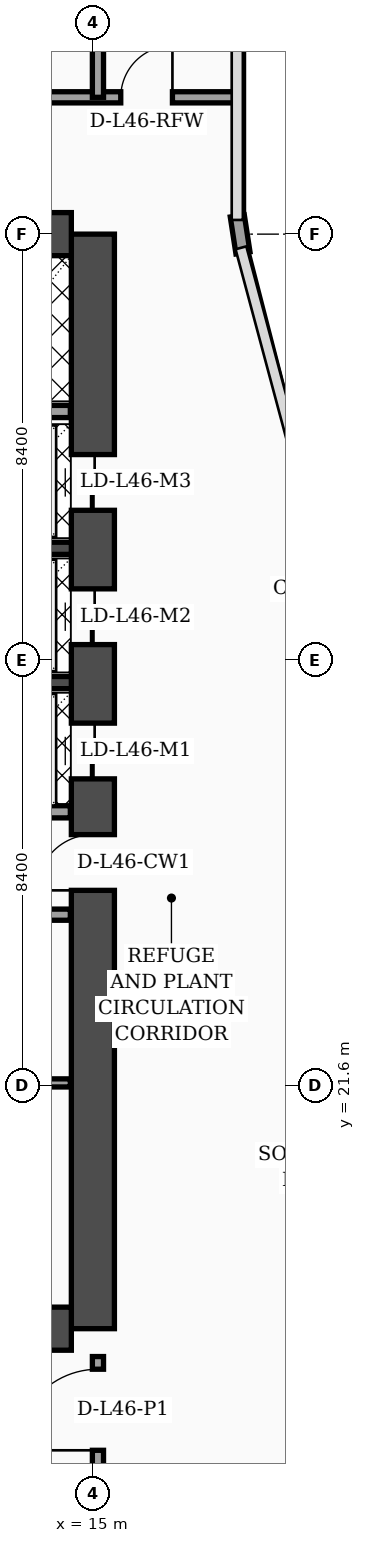
"""IFC4 building model, lengths in metres.
Left out: names, types, materials, properties, quantities, classifications, styles, units other than length and angle.
Written with IfcOpenShell. Run it as: python <this file> out.ifc"""

import sys

from ifc_helpers import new_model, si_unit, direction, frame, frame_2d, origin, place, context, subcontext, project, spatial, rectangle, extrude, element, fill, save


model = new_model("IFC4")
c1 = context("Model", 3, precision=1e-05, world=origin(), true_north=direction((0.0, 1.0)))
c2 = subcontext(c1, "Body", "Model", "MODEL_VIEW")
j1 = project(units=[si_unit("LENGTHUNIT", "METRE"), si_unit("PLANEANGLEUNIT", "RADIAN")], contexts=[c1])
p1 = place(None, origin())
s1 = spatial("IfcSite", under=j1, at=p1, CompositionType="ELEMENT")
p2 = place(p1, origin())
s2 = spatial("IfcBuilding", under=s1, at=p2, CompositionType="ELEMENT")
p3 = place(p2, frame((0.0, 0.0, 186.5)))
s3 = spatial("IfcBuildingStorey", under=s2, at=p3, CompositionType="ELEMENT", Elevation=186.5)
p4 = place(p3, frame((15.0, 16.8, 0.0), z_axis=(0.0, 0.0, 1.0), x_axis=(0.0, 1.0, 0.0)))
e1 = element("IfcWall", 1, at=p4, inside=s3, PredefinedType="SHEAR", context=c2, shape_type="SweptSolid", body=[
    extrude(rectangle(XDim=21.6, YDim=0.85, at=frame_2d((10.8, 0.0))), origin(), (0.0, 0.0, 1.0), 4.35),
])
p5 = place(p4, frame((8.65, 0.0, 0.0)))
e2 = element("IfcOpeningElement", 2, at=p5, cuts=e1, PredefinedType="OPENING", context=c2, shape_type="SweptSolid", body=[
    extrude(rectangle(XDim=1.1, YDim=2.2, at=frame_2d((0.55, 1.1))), frame((0.0, 0.435, 0.0), z_axis=(0.0, -1.0, 0.0), x_axis=(1.0, 0.0, 0.0)), (0.0, 0.0, 1.0), 0.87),
])
p6 = place(p4, frame((10.85, 0.0, 0.0)))
e3 = element("IfcOpeningElement", 3, at=p6, cuts=e1, PredefinedType="OPENING", context=c2, shape_type="SweptSolid", body=[
    extrude(rectangle(XDim=1.1, YDim=2.2, at=frame_2d((0.55, 1.1))), frame((0.0, 0.435, 0.0), z_axis=(0.0, -1.0, 0.0), x_axis=(1.0, 0.0, 0.0)), (0.0, 0.0, 1.0), 0.87),
])
p7 = place(p4, frame((13.5, 0.0, 0.0)))
e4 = element("IfcOpeningElement", 4, at=p7, cuts=e1, PredefinedType="OPENING", context=c2, shape_type="SweptSolid", body=[
    extrude(rectangle(XDim=1.1, YDim=2.2, at=frame_2d((0.55, 1.1))), frame((0.0, 0.435, 0.0), z_axis=(0.0, -1.0, 0.0), x_axis=(1.0, 0.0, 0.0)), (0.0, 0.0, 1.0), 0.87),
])
p8 = place(p4, frame((16.15, 0.0, 0.0)))
e5 = element("IfcOpeningElement", 5, at=p8, cuts=e1, PredefinedType="OPENING", context=c2, shape_type="SweptSolid", body=[
    extrude(rectangle(XDim=1.1, YDim=2.2, at=frame_2d((0.55, 1.1))), frame((0.0, 0.435, 0.0), z_axis=(0.0, -1.0, 0.0), x_axis=(1.0, 0.0, 0.0)), (0.0, 0.0, 1.0), 0.87),
])
for number, where, z_axis, x_axis in (
    (6, (4.625, 38.4, 0.0), (0.0, 0.0, 1.0), (1.0, 0.0, 0.0)),
    (7, (4.625, 16.8, 0.0), (0.0, 0.0, 1.0), (1.0, 0.0, 0.0)),
):
    element("IfcWall", number, at=place(p3, frame(where, z_axis=z_axis, x_axis=x_axis)), inside=s3, PredefinedType="SHEAR", context=c2, shape_type="SweptSolid", body=[
        extrude(rectangle(XDim=9.95, YDim=0.85, at=frame_2d((4.975, 0.0))), origin(), (0.0, 0.0, 1.0), 4.35),
    ])
for number, where, z_axis, x_axis in (
    (8, (12.18, 29.55, 0.0), (0.0, 0.0, 1.0), (1.0, 0.0, 0.0)),
    (9, (12.18, 32.2, 0.0), (0.0, 0.0, 1.0), (1.0, 0.0, 0.0)),
):
    element("IfcWall", number, at=place(p3, frame(where, z_axis=z_axis, x_axis=x_axis)), inside=s3, PredefinedType="SOLIDWALL", context=c2, shape_type="SweptSolid", body=[
        extrude(rectangle(XDim=2.395, YDim=0.24, at=frame_2d((1.198, 0.0))), origin(), (0.0, 0.0, 1.0), 4.35),
    ])
p9 = place(p3, frame((17.962, 38.03, 0.0), z_axis=(0.0, 0.0, 1.0), x_axis=(-0.15141125477, 0.988470855377, 0.0)))
e10 = element("IfcWall", 10, at=p9, inside=s3, PredefinedType="SOLIDWALL", context=c2, shape_type="SweptSolid", body=[
    extrude(rectangle(XDim=0.739, YDim=0.28, at=frame_2d((0.369, 0.0))), origin(), (0.0, 0.0, 1.0), 4.35),
])
p10 = place(p3, frame((9.68, 21.65, 0.0), z_axis=(0.0, 0.0, 1.0), x_axis=(1.0, 0.0, 0.0)))
e11 = element("IfcWall", 11, at=p10, inside=s3, PredefinedType="PARTITIONING", context=c2, shape_type="SweptSolid", body=[
    extrude(rectangle(XDim=4.875, YDim=0.16, at=frame_2d((2.438, 0.0))), origin(), (0.0, 0.0, 1.0), 4.35),
])
p11 = place(p10, frame((1.1, 0.0, 0.0)))
e12 = element("IfcOpeningElement", 12, at=p11, cuts=e11, PredefinedType="OPENING", context=c2, shape_type="SweptSolid", body=[
    extrude(rectangle(XDim=0.98, YDim=2.15, at=frame_2d((0.49, 1.075))), frame((0.0, 0.09, 0.0), z_axis=(0.0, -1.0, 0.0), x_axis=(1.0, 0.0, 0.0)), (0.0, 0.0, 1.0), 0.18),
])
p12 = place(p3, frame((9.68, 24.97, 0.0), z_axis=(0.0, 0.0, 1.0), x_axis=(1.0, 0.0, 0.0)))
e13 = element("IfcWall", 13, at=p12, inside=s3, PredefinedType="SOLIDWALL", context=c2, shape_type="SweptSolid", body=[
    extrude(rectangle(XDim=4.875, YDim=0.22, at=frame_2d((2.438, 0.0))), origin(), (0.0, 0.0, 1.0), 3.75),
])
p13 = place(p12, frame((0.9, 0.0, 0.0)))
e14 = element("IfcOpeningElement", 14, at=p13, cuts=e13, PredefinedType="OPENING", context=c2, shape_type="SweptSolid", body=[
    extrude(rectangle(XDim=0.98, YDim=2.15, at=frame_2d((0.49, 1.075))), frame((0.0, 0.12, 0.0), z_axis=(0.0, -1.0, 0.0), x_axis=(1.0, 0.0, 0.0)), (0.0, 0.0, 1.0), 0.24),
])
p14 = place(p3, frame((12.25, 27.0, 0.0), z_axis=(0.0, 0.0, 1.0), x_axis=(1.0, 0.0, 0.0)))
e15 = element("IfcWall", 15, at=p14, inside=s3, PredefinedType="SOLIDWALL", context=c2, shape_type="SweptSolid", body=[
    extrude(rectangle(XDim=2.305, YDim=0.24, at=frame_2d((1.152, 0.0))), origin(), (0.0, 0.0, 1.0), 4.35),
])
p15 = place(p3, frame((9.66, 34.9, 0.0), z_axis=(0.0, 0.0, 1.0), x_axis=(1.0, 0.0, 0.0)))
e16 = element("IfcWall", 16, at=p15, inside=s3, PredefinedType="SOLIDWALL", context=c2, shape_type="SweptSolid", body=[
    extrude(rectangle(XDim=4.895, YDim=0.24, at=frame_2d((2.448, 0.0))), origin(), (0.0, 0.0, 1.0), 4.35),
])
p16 = place(p3, frame((4.2, 41.1, 0.0), z_axis=(0.0, 0.0, 1.0), x_axis=(1.0, 0.0, 0.0)))
e17 = element("IfcWall", 17, at=p16, inside=s3, PredefinedType="SOLIDWALL", context=c2, shape_type="SweptSolid", body=[
    extrude(rectangle(XDim=13.65, YDim=0.22, at=frame_2d((6.825, 0.0))), origin(), (0.0, 0.0, 1.0), 3.75),
])
p17 = place(p16, frame((1.8, 0.0, 0.0)))
e18 = element("IfcOpeningElement", 18, at=p17, cuts=e17, PredefinedType="OPENING", context=c2, shape_type="SweptSolid", body=[
    extrude(rectangle(XDim=0.98, YDim=2.15, at=frame_2d((0.49, 1.075))), frame((0.0, 0.12, 0.0), z_axis=(0.0, -1.0, 0.0), x_axis=(1.0, 0.0, 0.0)), (0.0, 0.0, 1.0), 0.24),
])
p18 = place(p16, frame((6.8, 0.0, 0.0)))
e19 = element("IfcOpeningElement", 19, at=p18, cuts=e17, PredefinedType="OPENING", context=c2, shape_type="SweptSolid", body=[
    extrude(rectangle(XDim=1.15, YDim=2.2, at=frame_2d((0.575, 1.1))), frame((0.0, 0.12, 0.0), z_axis=(0.0, -1.0, 0.0), x_axis=(1.0, 0.0, 0.0)), (0.0, 0.0, 1.0), 0.24),
])
p19 = place(p16, frame((11.35, 0.0, 0.0)))
e20 = element("IfcOpeningElement", 20, at=p19, cuts=e17, PredefinedType="OPENING", context=c2, shape_type="SweptSolid", body=[
    extrude(rectangle(XDim=1.02, YDim=2.2, at=frame_2d((0.51, 1.1))), frame((0.0, 0.12, 0.0), z_axis=(0.0, -1.0, 0.0), x_axis=(1.0, 0.0, 0.0)), (0.0, 0.0, 1.0), 0.24),
])
p20 = place(p3, frame((15.1, 41.1, 0.0), z_axis=(0.0, 0.0, 1.0), x_axis=(0.0, 1.0, 0.0)))
e21 = element("IfcWall", 21, at=p20, inside=s3, PredefinedType="SOLIDWALL", context=c2, shape_type="SweptSolid", body=[
    extrude(rectangle(XDim=6.7, YDim=0.22, at=frame_2d((3.35, 0.0))), origin(), (0.0, 0.0, 1.0), 3.75),
])
p21 = place(p3, frame((15.1, 4.2, 0.0), z_axis=(0.0, 0.0, 1.0), x_axis=(0.0, 1.0, 0.0)))
e22 = element("IfcWall", 22, at=p21, inside=s3, PredefinedType="SOLIDWALL", context=c2, shape_type="SweptSolid", body=[
    extrude(rectangle(XDim=12.05, YDim=0.22, at=frame_2d((6.025, 0.0))), origin(), (0.0, 0.0, 1.0), 3.3),
])
p22 = place(p21, frame((10.2, 0.0, 0.0)))
e23 = element("IfcOpeningElement", 23, at=p22, cuts=e22, PredefinedType="OPENING", context=c2, shape_type="SweptSolid", body=[
    extrude(rectangle(XDim=1.6, YDim=2.35, at=frame_2d((0.8, 1.175))), frame((0.0, 0.12, 0.0), z_axis=(0.0, -1.0, 0.0), x_axis=(1.0, 0.0, 0.0)), (0.0, 0.0, 1.0), 0.24),
])
p23 = place(p19, origin())
e24 = element("IfcDoor", 24, at=p23, inside=s3, OperationType="SINGLE_SWING_RIGHT", PredefinedType="DOOR", context=c2, shape_type="SweptSolid", body=[
    extrude(rectangle(XDim=1.02, YDim=2.2, at=frame_2d((0.51, 1.1))), frame((0.0, 0.025, 0.0), z_axis=(0.0, -1.0, 0.0), x_axis=(1.0, 0.0, 0.0)), (0.0, 0.0, 1.0), 0.05),
])
fill(e20, e24)
p24 = place(p22, origin())
e25 = element("IfcDoor", 25, at=p24, inside=s3, OperationType="SINGLE_SWING_LEFT", PredefinedType="DOOR", context=c2, shape_type="SweptSolid", body=[
    extrude(rectangle(XDim=1.6, YDim=2.35, at=frame_2d((0.8, 1.175))), frame((0.0, 0.025, 0.0), z_axis=(0.0, -1.0, 0.0), x_axis=(1.0, 0.0, 0.0)), (0.0, 0.0, 1.0), 0.05),
])
fill(e23, e25)
p25 = place(p5, origin())
e26 = element("IfcDoor", 26, at=p25, inside=s3, OperationType="SINGLE_SWING_LEFT", PredefinedType="DOOR", context=c2, shape_type="SweptSolid", body=[
    extrude(rectangle(XDim=1.1, YDim=2.2, at=frame_2d((0.55, 1.1))), frame((0.0, 0.025, 0.0), z_axis=(0.0, -1.0, 0.0), x_axis=(1.0, 0.0, 0.0)), (0.0, 0.0, 1.0), 0.05),
])
fill(e2, e26)
p26 = place(p6, origin())
e27 = element("IfcDoor", 27, at=p26, inside=s3, OperationType="DOUBLE_DOOR_SLIDING", PredefinedType="DOOR", context=c2, shape_type="SweptSolid", body=[
    extrude(rectangle(XDim=1.1, YDim=2.2, at=frame_2d((0.55, 1.1))), frame((0.0, 0.025, 0.0), z_axis=(0.0, -1.0, 0.0), x_axis=(1.0, 0.0, 0.0)), (0.0, 0.0, 1.0), 0.05),
])
fill(e3, e27)
p27 = place(p7, origin())
e28 = element("IfcDoor", 28, at=p27, inside=s3, OperationType="DOUBLE_DOOR_SLIDING", PredefinedType="DOOR", context=c2, shape_type="SweptSolid", body=[
    extrude(rectangle(XDim=1.1, YDim=2.2, at=frame_2d((0.55, 1.1))), frame((0.0, 0.025, 0.0), z_axis=(0.0, -1.0, 0.0), x_axis=(1.0, 0.0, 0.0)), (0.0, 0.0, 1.0), 0.05),
])
fill(e4, e28)
p28 = place(p8, origin())
e29 = element("IfcDoor", 29, at=p28, inside=s3, OperationType="DOUBLE_DOOR_SLIDING", PredefinedType="DOOR", context=c2, shape_type="SweptSolid", body=[
    extrude(rectangle(XDim=1.1, YDim=2.2, at=frame_2d((0.55, 1.1))), frame((0.0, 0.025, 0.0), z_axis=(0.0, -1.0, 0.0), x_axis=(1.0, 0.0, 0.0)), (0.0, 0.0, 1.0), 0.05),
])
fill(e5, e29)
save(model, sys.argv[1])
